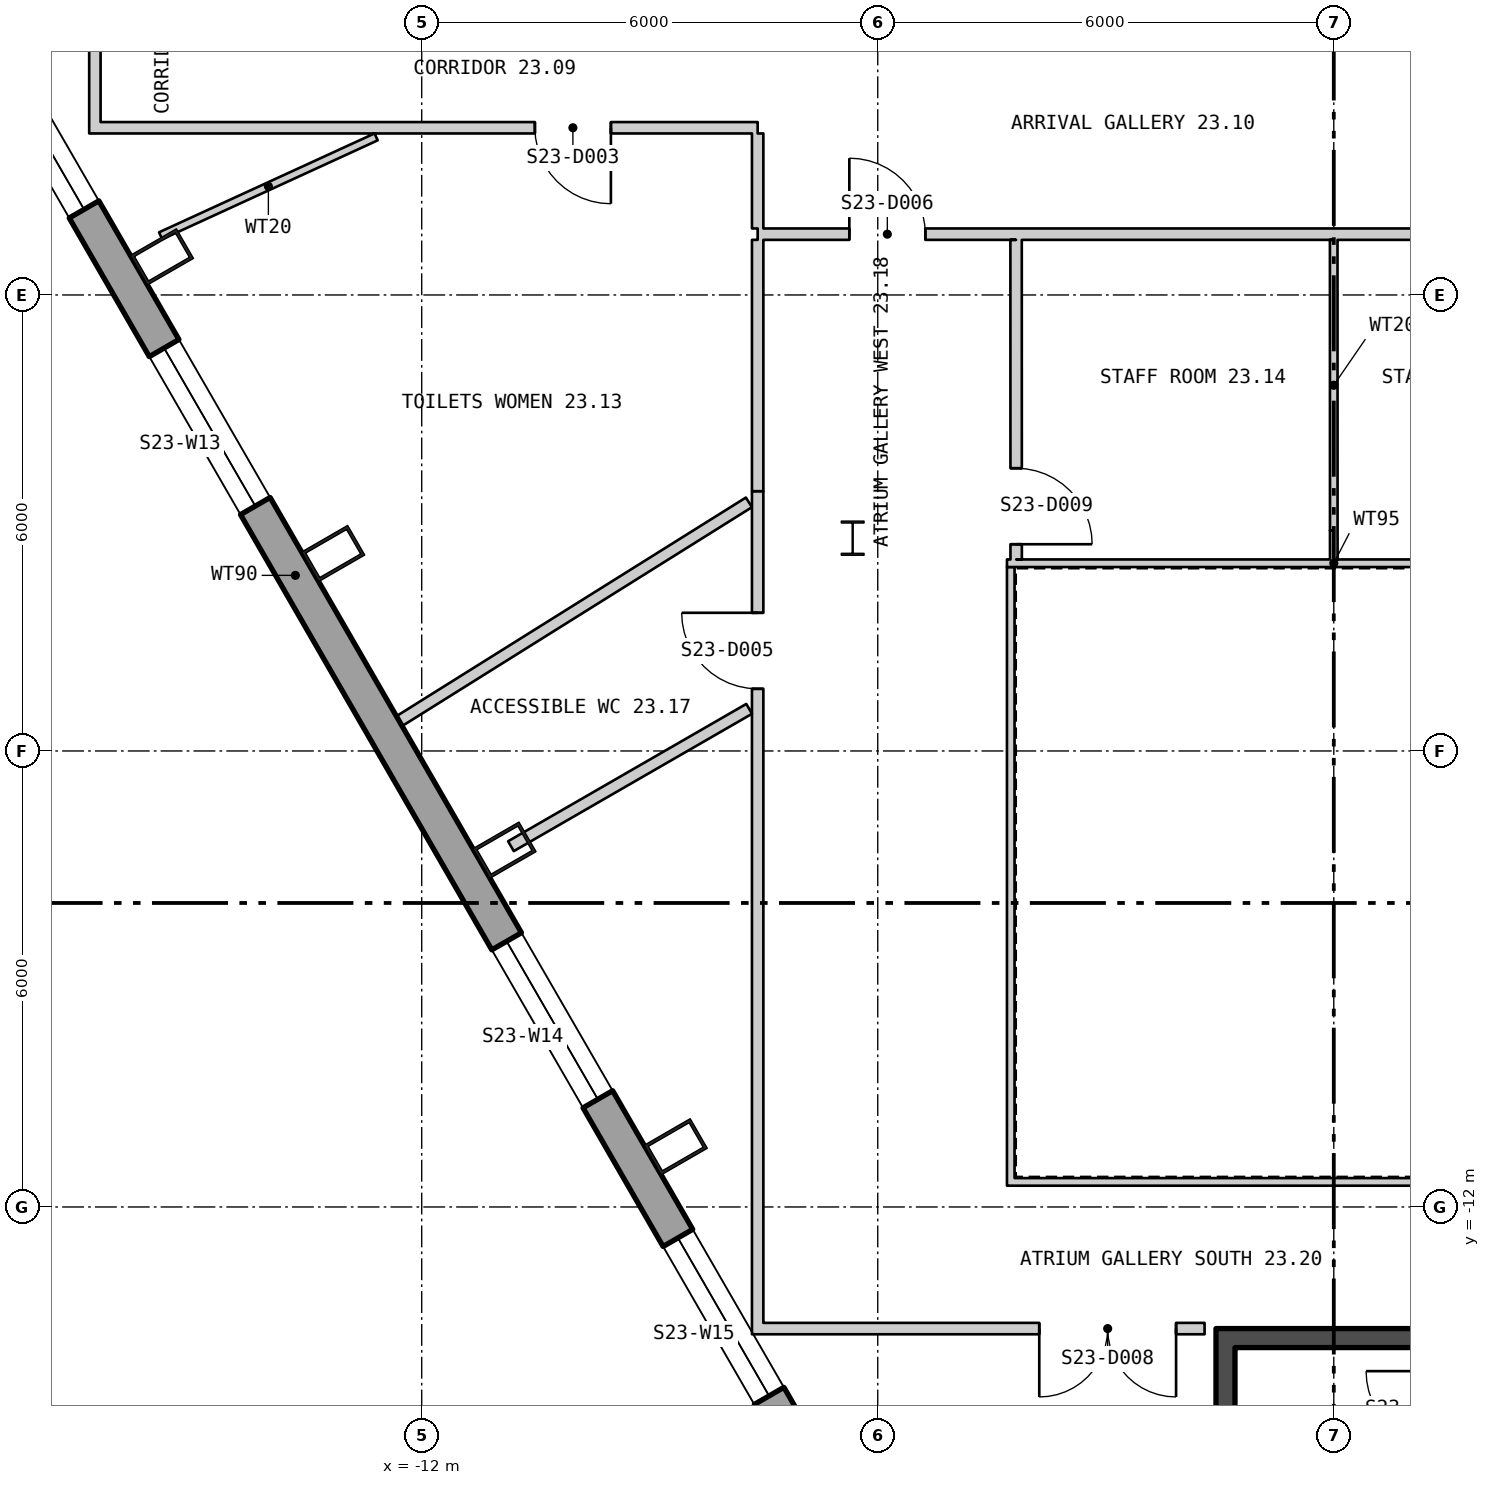
"""IFC4 building model, lengths in metres.
Left out: names, types, materials, properties, quantities, classifications, styles, units other than length and angle.
Written with IfcOpenShell. Run it as: python <this file> out.ifc"""

import sys

from ifc_helpers import new_model, si_unit, direction, frame, frame_2d, origin, origin_2d, place, context, subcontext, project, spatial, polyline, rectangle, hollow_rectangle, i_section, outline, extrude, element, fill, save


model = new_model("IFC4")
c1 = context("Model", 3, precision=1e-05, world=origin(), true_north=direction((0.0, 1.0)))
c2 = subcontext(c1, "Body", "Model", "MODEL_VIEW")
j1 = project(units=[si_unit("LENGTHUNIT", "METRE"), si_unit("PLANEANGLEUNIT", "RADIAN")], contexts=[c1])
p1 = place(None, origin())
s1 = spatial("IfcSite", under=j1, at=p1, CompositionType="ELEMENT")
p2 = place(p1, origin())
s2 = spatial("IfcBuilding", under=s1, at=p2, CompositionType="ELEMENT")
p3 = place(p2, frame((0.0, 0.0, 304.2)))
s3 = spatial("IfcBuildingStorey", under=s2, at=p3, CompositionType="ELEMENT", Elevation=304.2)
for number, where, z_axis, x_axis in (
    (1, (-15.418, 0.501, 0.0), (0.0, 0.0, 1.0), (0.5, -0.866, 0.0)),
    (2, (-13.165, -3.402, 0.0), (0.0, 0.0, 1.0), (0.5, -0.866, 0.0)),
    (3, (-10.911, -7.305, 0.0), (0.0, 0.0, 1.0), (0.5, -0.866, 0.0)),
    (4, (-8.658, -11.208, 0.0), (0.0, 0.0, 1.0), (0.5, -0.866, 0.0)),
):
    element("IfcColumn", number, at=place(p3, frame(where, z_axis=z_axis, x_axis=x_axis)), inside=s3, PredefinedType="COLUMN", context=c2, shape_type="SweptSolid", body=[
        extrude(hollow_rectangle(XDim=0.45, YDim=0.7, WallThickness=0.04, at=origin_2d()), origin(), (0.0, 0.0, 1.0), 4.2),
    ])
p4 = place(p3, frame((-6.33, -3.2, 0.0), z_axis=(0.0, 0.0, 1.0), x_axis=(1.0, 0.0, 0.0)))
e5 = element("IfcColumn", 5, at=p4, inside=s3, PredefinedType="COLUMN", context=c2, shape_type="SweptSolid", body=[
    extrude(i_section(OverallWidth=0.3, OverallDepth=0.45, WebThickness=0.014, FlangeThickness=0.026, at=origin_2d()), origin(), (0.0, 0.0, 1.0), 4.2),
])
p5 = place(p3, frame((-25.095, 16.112, -0.18), z_axis=(0.0, 0.0, 1.0), x_axis=(0.500000141277, -0.866025322218, 0.0)))
e6 = element("IfcWall", 6, at=p5, inside=s3, PredefinedType="SOLIDWALL", context=c2, shape_type="SweptSolid", body=[
    extrude(outline(polyline([(-0.13, -0.225), (45.86, -0.225), (45.6, 0.225), (0.13, 0.225), (-0.13, -0.225)])), origin(), (0.0, 0.0, 1.0), 3.98),
])
p6 = place(p5, frame((1.424, 0.0, 1.08)))
e7 = element("IfcOpeningElement", 7, at=p6, cuts=e6, PredefinedType="OPENING", context=c2, shape_type="SweptSolid", body=[
    extrude(rectangle(XDim=2.4, YDim=2.3, at=frame_2d((1.2, 1.15))), frame((0.0, 0.235, 0.0), z_axis=(0.0, -1.0, 0.0), x_axis=(1.0, 0.0, 0.0)), (0.0, 0.0, 1.0), 0.47),
])
p7 = place(p5, frame((5.892, 0.0, 1.08)))
e8 = element("IfcOpeningElement", 8, at=p7, cuts=e6, PredefinedType="OPENING", context=c2, shape_type="SweptSolid", body=[
    extrude(rectangle(XDim=2.4, YDim=2.3, at=frame_2d((1.2, 1.15))), frame((0.0, 0.235, 0.0), z_axis=(0.0, -1.0, 0.0), x_axis=(1.0, 0.0, 0.0)), (0.0, 0.0, 1.0), 0.47),
])
p8 = place(p5, frame((10.399, 0.0, 1.08)))
e9 = element("IfcOpeningElement", 9, at=p8, cuts=e6, PredefinedType="OPENING", context=c2, shape_type="SweptSolid", body=[
    extrude(rectangle(XDim=2.4, YDim=2.3, at=frame_2d((1.2, 1.15))), frame((0.0, 0.235, 0.0), z_axis=(0.0, -1.0, 0.0), x_axis=(1.0, 0.0, 0.0)), (0.0, 0.0, 1.0), 0.47),
])
p9 = place(p5, frame((14.905, 0.0, 1.08)))
e10 = element("IfcOpeningElement", 10, at=p9, cuts=e6, PredefinedType="OPENING", context=c2, shape_type="SweptSolid", body=[
    extrude(rectangle(XDim=2.4, YDim=2.3, at=frame_2d((1.2, 1.15))), frame((0.0, 0.235, 0.0), z_axis=(0.0, -1.0, 0.0), x_axis=(1.0, 0.0, 0.0)), (0.0, 0.0, 1.0), 0.47),
])
p10 = place(p5, frame((19.412, 0.0, 1.08)))
e11 = element("IfcOpeningElement", 11, at=p10, cuts=e6, PredefinedType="OPENING", context=c2, shape_type="SweptSolid", body=[
    extrude(rectangle(XDim=2.4, YDim=2.3, at=frame_2d((1.2, 1.15))), frame((0.0, 0.235, 0.0), z_axis=(0.0, -1.0, 0.0), x_axis=(1.0, 0.0, 0.0)), (0.0, 0.0, 1.0), 0.47),
])
p11 = place(p5, frame((28.425, 0.0, 1.08)))
e12 = element("IfcOpeningElement", 12, at=p11, cuts=e6, PredefinedType="OPENING", context=c2, shape_type="SweptSolid", body=[
    extrude(rectangle(XDim=2.4, YDim=2.3, at=frame_2d((1.2, 1.15))), frame((0.0, 0.235, 0.0), z_axis=(0.0, -1.0, 0.0), x_axis=(1.0, 0.0, 0.0)), (0.0, 0.0, 1.0), 0.47),
])
p12 = place(p5, frame((32.932, 0.0, 1.08)))
e13 = element("IfcOpeningElement", 13, at=p12, cuts=e6, PredefinedType="OPENING", context=c2, shape_type="SweptSolid", body=[
    extrude(rectangle(XDim=2.4, YDim=2.3, at=frame_2d((1.2, 1.15))), frame((0.0, 0.235, 0.0), z_axis=(0.0, -1.0, 0.0), x_axis=(1.0, 0.0, 0.0)), (0.0, 0.0, 1.0), 0.47),
])
p13 = place(p5, frame((37.438, 0.0, 1.08)))
e14 = element("IfcOpeningElement", 14, at=p13, cuts=e6, PredefinedType="OPENING", context=c2, shape_type="SweptSolid", body=[
    extrude(rectangle(XDim=2.4, YDim=2.3, at=frame_2d((1.2, 1.15))), frame((0.0, 0.235, 0.0), z_axis=(0.0, -1.0, 0.0), x_axis=(1.0, 0.0, 0.0)), (0.0, 0.0, 1.0), 0.47),
])
p14 = place(p5, frame((41.907, 0.0, 1.08)))
e15 = element("IfcOpeningElement", 15, at=p14, cuts=e6, PredefinedType="OPENING", context=c2, shape_type="SweptSolid", body=[
    extrude(rectangle(XDim=2.4, YDim=2.3, at=frame_2d((1.2, 1.15))), frame((0.0, 0.235, 0.0), z_axis=(0.0, -1.0, 0.0), x_axis=(1.0, 0.0, 0.0)), (0.0, 0.0, 1.0), 0.47),
])
for number, where, z_axis, x_axis in (
    (16, (-4.3, -11.67, 0.0), (0.0, 0.0, 1.0), (1.0, 0.0, 0.0)),
    (17, (4.3, -3.53, 0.0), (0.0, 0.0, 1.0), (-1.0, 0.0, 0.0)),
):
    element("IfcWall", number, at=place(p3, frame(where, z_axis=z_axis, x_axis=x_axis)), inside=s3, PredefinedType="PARTITIONING", context=c2, shape_type="SweptSolid", body=[
        extrude(rectangle(XDim=8.6, YDim=0.1, at=frame_2d((4.3, 0.0))), origin(), (0.0, 0.0, 1.0), 4.0),
    ])
p15 = place(p3, frame((-4.25, -3.58, 0.0), z_axis=(0.0, 0.0, 1.0), x_axis=(0.0, -1.0, 0.0)))
e18 = element("IfcWall", 18, at=p15, inside=s3, PredefinedType="PARTITIONING", context=c2, shape_type="SweptSolid", body=[
    extrude(rectangle(XDim=8.04, YDim=0.1, at=frame_2d((4.02, 0.0))), origin(), (0.0, 0.0, 1.0), 4.0),
])
p16 = place(p3, frame((-1.425, -21.05, 0.0), z_axis=(0.0, 0.0, 1.0), x_axis=(0.0, 1.0, 0.0)))
e19 = element("IfcWall", 19, at=p16, inside=s3, PredefinedType="SHEAR", context=c2, shape_type="SweptSolid", body=[
    extrude(rectangle(XDim=7.2, YDim=0.25, at=frame_2d((3.6, 0.0))), origin(), (0.0, 0.0, 1.0), 4.0),
])
p17 = place(p3, frame((-1.55, -13.725, 0.0), z_axis=(0.0, 0.0, 1.0), x_axis=(1.0, 0.0, 0.0)))
e20 = element("IfcWall", 20, at=p17, inside=s3, PredefinedType="SHEAR", context=c2, shape_type="SweptSolid", body=[
    extrude(rectangle(XDim=3.1, YDim=0.25, at=frame_2d((1.55, 0.0))), origin(), (0.0, 0.0, 1.0), 4.0),
])
p18 = place(p3, frame((-16.3, 2.125, 0.0), z_axis=(0.0, 0.0, 1.0), x_axis=(0.0, 1.0, 0.0)))
e21 = element("IfcWall", 21, at=p18, inside=s3, PredefinedType="PARTITIONING", context=c2, shape_type="SweptSolid", body=[
    extrude(rectangle(XDim=17.623, YDim=0.15, at=frame_2d((8.812, 0.0))), origin(), (0.0, 0.0, 1.0), 4.0),
])
p19 = place(p18, frame((5.078, 0.0, 0.0)))
e22 = element("IfcOpeningElement", 22, at=p19, cuts=e21, PredefinedType="OPENING", context=c2, shape_type="SweptSolid", body=[
    extrude(rectangle(XDim=1.0, YDim=2.1, at=frame_2d((0.5, 1.05))), frame((0.0, 0.085, 0.0), z_axis=(0.0, -1.0, 0.0), x_axis=(1.0, 0.0, 0.0)), (0.0, 0.0, 1.0), 0.17),
])
p20 = place(p18, frame((12.654, 0.0, 0.0)))
e23 = element("IfcOpeningElement", 23, at=p20, cuts=e21, PredefinedType="OPENING", context=c2, shape_type="SweptSolid", body=[
    extrude(rectangle(XDim=1.8, YDim=2.1, at=frame_2d((0.9, 1.05))), frame((0.0, 0.085, 0.0), z_axis=(0.0, -1.0, 0.0), x_axis=(1.0, 0.0, 0.0)), (0.0, 0.0, 1.0), 0.17),
])
p21 = place(p3, frame((-16.225, 2.2, 0.0), z_axis=(0.0, 0.0, 1.0), x_axis=(1.0, 0.0, 0.0)))
e24 = element("IfcWall", 24, at=p21, inside=s3, PredefinedType="PARTITIONING", context=c2, shape_type="SweptSolid", body=[
    extrude(rectangle(XDim=8.645, YDim=0.15, at=frame_2d((4.322, 0.0))), origin(), (0.0, 0.0, 1.0), 4.0),
])
p22 = place(p21, frame((5.714, 0.0, 0.0)))
e25 = element("IfcOpeningElement", 25, at=p22, cuts=e24, PredefinedType="OPENING", context=c2, shape_type="SweptSolid", body=[
    extrude(rectangle(XDim=1.0, YDim=2.1, at=frame_2d((0.5, 1.05))), frame((0.0, 0.085, 0.0), z_axis=(0.0, -1.0, 0.0), x_axis=(1.0, 0.0, 0.0)), (0.0, 0.0, 1.0), 0.17),
])
p23 = place(p3, frame((-15.435, 0.779, 0.0), z_axis=(0.0, 0.0, 1.0), x_axis=(0.908867400556, 0.417085180996, 0.0)))
e26 = element("IfcWall", 26, at=p23, inside=s3, PredefinedType="PARTITIONING", context=c2, shape_type="SweptSolid", body=[
    extrude(rectangle(XDim=3.119, YDim=0.1, at=frame_2d((1.56, 0.0))), origin(), (0.0, 0.0, 1.0), 4.0),
])
p24 = place(p3, frame((-12.295, -5.607, 0.0), z_axis=(0.0, 0.0, 1.0), x_axis=(0.847749725297, 0.530396458566, 0.0)))
e27 = element("IfcWall", 27, at=p24, inside=s3, PredefinedType="PARTITIONING", context=c2, shape_type="SweptSolid", body=[
    extrude(rectangle(XDim=5.426, YDim=0.15, at=frame_2d((2.713, 0.0))), origin(), (0.0, 0.0, 1.0), 4.0),
])
p25 = place(p3, frame((-10.826, -7.253, 0.0), z_axis=(0.0, 0.0, 1.0), x_axis=(0.866314412185, 0.499499088328, 0.0)))
e28 = element("IfcWall", 28, at=p25, inside=s3, PredefinedType="PARTITIONING", context=c2, shape_type="SweptSolid", body=[
    extrude(rectangle(XDim=3.618, YDim=0.15, at=frame_2d((1.809, 0.0))), origin(), (0.0, 0.0, 1.0), 4.0),
])
p26 = place(p3, frame((-7.58, -13.675, 0.0), z_axis=(0.0, 0.0, 1.0), x_axis=(0.0, 1.0, 0.0)))
e29 = element("IfcWall", 29, at=p26, inside=s3, PredefinedType="PARTITIONING", context=c2, shape_type="SweptSolid", body=[
    extrude(rectangle(XDim=11.093, YDim=0.15, at=frame_2d((5.546, 0.0))), origin(), (0.0, 0.0, 1.0), 4.0),
])
p27 = place(p26, frame((8.493, 0.0, 0.0)))
e30 = element("IfcOpeningElement", 30, at=p27, cuts=e29, PredefinedType="OPENING", context=c2, shape_type="SweptSolid", body=[
    extrude(rectangle(XDim=1.0, YDim=2.1, at=frame_2d((0.5, 1.05))), frame((0.0, 0.085, 0.0), z_axis=(0.0, -1.0, 0.0), x_axis=(1.0, 0.0, 0.0)), (0.0, 0.0, 1.0), 0.17),
])
p28 = place(p3, frame((-7.58, -2.582, 0.0), z_axis=(0.0, 0.0, 1.0), x_axis=(0.0, 1.0, 0.0)))
e31 = element("IfcWall", 31, at=p28, inside=s3, PredefinedType="PARTITIONING", context=c2, shape_type="SweptSolid", body=[
    extrude(rectangle(XDim=3.307, YDim=0.15, at=frame_2d((1.653, 0.0))), origin(), (0.0, 0.0, 1.0), 4.0),
])
p29 = place(p3, frame((-7.58, 0.8, 0.0), z_axis=(0.0, 0.0, 1.0), x_axis=(1.0, 0.0, 0.0)))
e32 = element("IfcWall", 32, at=p29, inside=s3, PredefinedType="PARTITIONING", context=c2, shape_type="SweptSolid", body=[
    extrude(rectangle(XDim=15.085, YDim=0.15, at=frame_2d((7.543, 0.0))), origin(), (0.0, 0.0, 1.0), 4.0),
])
p30 = place(p29, frame((1.206, 0.0, 0.0)))
e33 = element("IfcOpeningElement", 33, at=p30, cuts=e32, PredefinedType="OPENING", context=c2, shape_type="SweptSolid", body=[
    extrude(rectangle(XDim=1.0, YDim=2.1, at=frame_2d((0.5, 1.05))), frame((0.0, 0.085, 0.0), z_axis=(0.0, -1.0, 0.0), x_axis=(1.0, 0.0, 0.0)), (0.0, 0.0, 1.0), 0.17),
])
p31 = place(p29, frame((12.917, 0.0, 0.0)))
e34 = element("IfcOpeningElement", 34, at=p31, cuts=e32, PredefinedType="OPENING", context=c2, shape_type="SweptSolid", body=[
    extrude(rectangle(XDim=1.0, YDim=2.1, at=frame_2d((0.5, 1.05))), frame((0.0, 0.085, 0.0), z_axis=(0.0, -1.0, 0.0), x_axis=(1.0, 0.0, 0.0)), (0.0, 0.0, 1.0), 0.17),
])
p32 = place(p3, frame((-7.58, 0.875, 0.0), z_axis=(0.0, 0.0, 1.0), x_axis=(0.0, 1.0, 0.0)))
e35 = element("IfcWall", 35, at=p32, inside=s3, PredefinedType="PARTITIONING", context=c2, shape_type="SweptSolid", body=[
    extrude(rectangle(XDim=1.25, YDim=0.15, at=frame_2d((0.625, 0.0))), origin(), (0.0, 0.0, 1.0), 4.0),
])
p33 = place(p3, frame((-7.505, -13.6, 0.0), z_axis=(0.0, 0.0, 1.0), x_axis=(1.0, 0.0, 0.0)))
e36 = element("IfcWall", 36, at=p33, inside=s3, PredefinedType="PARTITIONING", context=c2, shape_type="SweptSolid", body=[
    extrude(rectangle(XDim=0.43, YDim=0.15, at=frame_2d((0.215, 0.0))), origin(), (0.0, 0.0, 1.0), 4.0),
])
p34 = place(p3, frame((-7.075, -13.6, 0.0), z_axis=(0.0, 0.0, 1.0), x_axis=(1.0, 0.0, 0.0)))
e37 = element("IfcWall", 37, at=p34, inside=s3, PredefinedType="PARTITIONING", context=c2, shape_type="SweptSolid", body=[
    extrude(rectangle(XDim=5.375, YDim=0.15, at=frame_2d((2.688, 0.0))), origin(), (0.0, 0.0, 1.0), 3.186),
])
p35 = place(p34, frame((3.2, 0.0, 0.0)))
e38 = element("IfcOpeningElement", 38, at=p35, cuts=e37, PredefinedType="OPENING", context=c2, shape_type="SweptSolid", body=[
    extrude(rectangle(XDim=1.8, YDim=2.1, at=frame_2d((0.9, 1.05))), frame((0.0, 0.085, 0.0), z_axis=(0.0, -1.0, 0.0), x_axis=(1.0, 0.0, 0.0)), (0.0, 0.0, 1.0), 0.17),
])
p36 = place(p3, frame((-4.18, 0.725, 0.0), z_axis=(0.0, 0.0, 1.0), x_axis=(0.000237812122, -0.999999971723, 0.0)))
e39 = element("IfcWall", 39, at=p36, inside=s3, PredefinedType="PARTITIONING", context=c2, shape_type="SweptSolid", body=[
    extrude(rectangle(XDim=4.205, YDim=0.15, at=frame_2d((2.103, 0.0))), origin(), (0.0, 0.0, 1.0), 4.0),
])
p37 = place(p36, frame((3.005, 0.0, 0.0)))
e40 = element("IfcOpeningElement", 40, at=p37, cuts=e39, PredefinedType="OPENING", context=c2, shape_type="SweptSolid", body=[
    extrude(rectangle(XDim=1.0, YDim=2.1, at=frame_2d((0.5, 1.05))), frame((0.0, 0.085, 0.0), z_axis=(0.0, -1.0, 0.0), x_axis=(1.0, 0.0, 0.0)), (0.0, 0.0, 1.0), 0.17),
])
p38 = place(p3, frame((-0.001, 0.725, 0.0), z_axis=(0.0, 0.0, 1.0), x_axis=(0.000235294111, -0.999999972318, 0.0)))
e41 = element("IfcWall", 41, at=p38, inside=s3, PredefinedType="PARTITIONING", context=c2, shape_type="SweptSolid", body=[
    extrude(rectangle(XDim=3.825, YDim=0.1, at=frame_2d((1.913, 0.0))), origin(), (0.0, 0.0, 1.0), 3.55),
])
p39 = place(p3, frame((-0.0, -3.1, 0.0), z_axis=(0.0, 0.0, 1.0), x_axis=(0.000263157886, -0.999999965374, 0.0)))
e42 = element("IfcWall", 42, at=p39, inside=s3, PredefinedType="PARTITIONING", context=c2, shape_type="SweptSolid", body=[
    extrude(rectangle(XDim=0.38, YDim=0.1, at=frame_2d((0.19, 0.0))), origin(), (0.0, 0.0, 1.0), 4.0),
])
p40 = place(p9, origin())
e43 = element("IfcWindow", 43, at=p40, inside=s3, PartitioningType="SINGLE_PANEL", PredefinedType="WINDOW", context=c2, shape_type="SweptSolid", body=[
    extrude(rectangle(XDim=2.4, YDim=2.3, at=frame_2d((1.2, 1.15))), frame((0.0, 0.105, 0.0), z_axis=(0.0, -1.0, 0.0), x_axis=(1.0, 0.0, 0.0)), (0.0, 0.0, 1.0), 0.06),
])
fill(e10, e43)
p41 = place(p10, origin())
e44 = element("IfcWindow", 44, at=p41, inside=s3, PartitioningType="SINGLE_PANEL", PredefinedType="WINDOW", context=c2, shape_type="SweptSolid", body=[
    extrude(rectangle(XDim=2.4, YDim=2.3, at=frame_2d((1.2, 1.15))), frame((0.0, 0.105, 0.0), z_axis=(0.0, -1.0, 0.0), x_axis=(1.0, 0.0, 0.0)), (0.0, 0.0, 1.0), 0.06),
])
fill(e11, e44)
p42 = place(p11, origin())
e45 = element("IfcWindow", 45, at=p42, inside=s3, PartitioningType="SINGLE_PANEL", PredefinedType="WINDOW", context=c2, shape_type="SweptSolid", body=[
    extrude(rectangle(XDim=2.4, YDim=2.3, at=frame_2d((1.2, 1.15))), frame((0.0, 0.105, 0.0), z_axis=(0.0, -1.0, 0.0), x_axis=(1.0, 0.0, 0.0)), (0.0, 0.0, 1.0), 0.06),
])
fill(e12, e45)
p43 = place(p12, origin())
e46 = element("IfcWindow", 46, at=p43, inside=s3, PartitioningType="SINGLE_PANEL", PredefinedType="WINDOW", context=c2, shape_type="SweptSolid", body=[
    extrude(rectangle(XDim=2.4, YDim=2.3, at=frame_2d((1.2, 1.15))), frame((0.0, 0.105, 0.0), z_axis=(0.0, -1.0, 0.0), x_axis=(1.0, 0.0, 0.0)), (0.0, 0.0, 1.0), 0.06),
])
fill(e13, e46)
p44 = place(p22, origin())
e47 = element("IfcDoor", 47, at=p44, inside=s3, OperationType="SINGLE_SWING_RIGHT", PredefinedType="DOOR", context=c2, shape_type="SweptSolid", body=[
    extrude(rectangle(XDim=1.0, YDim=2.1, at=frame_2d((0.5, 1.05))), frame((0.0, 0.025, 0.0), z_axis=(0.0, -1.0, 0.0), x_axis=(1.0, 0.0, 0.0)), (0.0, 0.0, 1.0), 0.05),
])
fill(e25, e47)
p45 = place(p27, origin())
e48 = element("IfcDoor", 48, at=p45, inside=s3, OperationType="SINGLE_SWING_LEFT", PredefinedType="DOOR", context=c2, shape_type="SweptSolid", body=[
    extrude(rectangle(XDim=1.0, YDim=2.1, at=frame_2d((0.5, 1.05))), frame((0.0, 0.025, 0.0), z_axis=(0.0, -1.0, 0.0), x_axis=(1.0, 0.0, 0.0)), (0.0, 0.0, 1.0), 0.05),
])
fill(e30, e48)
p46 = place(p30, origin())
e49 = element("IfcDoor", 49, at=p46, inside=s3, OperationType="SINGLE_SWING_RIGHT", PredefinedType="DOOR", context=c2, shape_type="SweptSolid", body=[
    extrude(rectangle(XDim=1.0, YDim=2.1, at=frame_2d((0.5, 1.05))), frame((0.0, 0.025, 0.0), z_axis=(0.0, -1.0, 0.0), x_axis=(1.0, 0.0, 0.0)), (0.0, 0.0, 1.0), 0.05),
])
fill(e33, e49)
p47 = place(p35, origin())
e50 = element("IfcDoor", 50, at=p47, inside=s3, OperationType="DOUBLE_DOOR_SINGLE_SWING", PredefinedType="DOOR", context=c2, shape_type="SweptSolid", body=[
    extrude(rectangle(XDim=1.8, YDim=2.1, at=frame_2d((0.9, 1.05))), frame((0.0, 0.025, 0.0), z_axis=(0.0, -1.0, 0.0), x_axis=(1.0, 0.0, 0.0)), (0.0, 0.0, 1.0), 0.05),
])
fill(e38, e50)
p48 = place(p37, origin())
e51 = element("IfcDoor", 51, at=p48, inside=s3, OperationType="SINGLE_SWING_LEFT", PredefinedType="DOOR", context=c2, shape_type="SweptSolid", body=[
    extrude(rectangle(XDim=1.0, YDim=2.1, at=frame_2d((0.5, 1.05))), frame((0.0, 0.025, 0.0), z_axis=(0.0, -1.0, 0.0), x_axis=(1.0, 0.0, 0.0)), (0.0, 0.0, 1.0), 0.05),
])
fill(e40, e51)
save(model, sys.argv[1])
